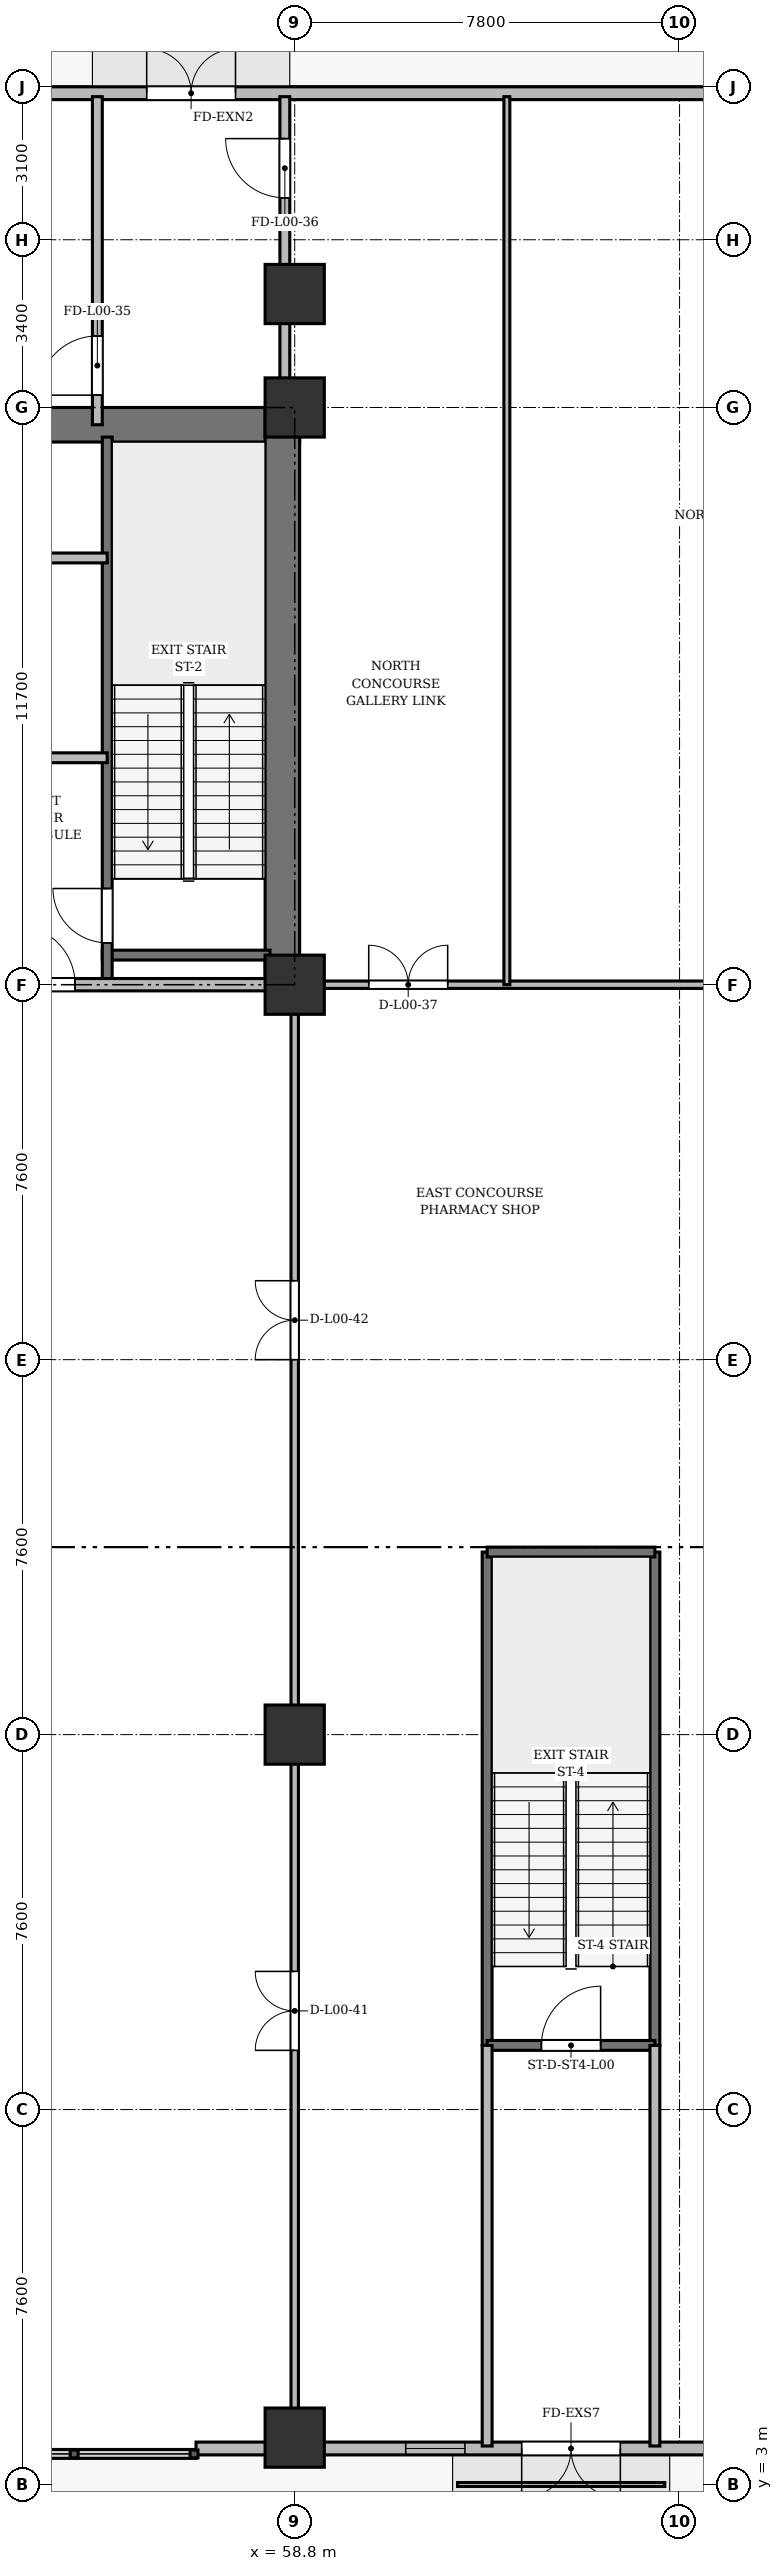
"""IFC4 building model, lengths in metres.
Left out: names, types, materials, properties, quantities, classifications, styles, units other than length and angle.
Written with IfcOpenShell. Run it as: python <this file> out.ifc"""

import sys

from ifc_helpers import new_model, si_unit, direction, frame, frame_2d, origin, origin_2d, place, context, subcontext, project, spatial, rectangle, extrude, source, transform, mapped, element, fill, save


model = new_model("IFC4")
c1 = context("Model", 3, precision=1e-05, world=origin(), true_north=direction((0.0, 1.0)))
c2 = subcontext(c1, "Body", "Model", "MODEL_VIEW")
j1 = project(units=[si_unit("LENGTHUNIT", "METRE"), si_unit("PLANEANGLEUNIT", "RADIAN")], contexts=[c1])
p1 = place(None, origin())
s1 = spatial("IfcSite", under=j1, at=p1, CompositionType="ELEMENT")
p2 = place(p1, origin())
s2 = spatial("IfcBuilding", under=s1, at=p2, CompositionType="ELEMENT")
p3 = place(p2, origin())
s3 = spatial("IfcBuildingStorey", under=s2, at=p3, CompositionType="ELEMENT", Elevation=0.0)
m1 = source(origin(), c2, "Body", "SweptSolid", [
    extrude(rectangle(XDim=1.2, YDim=1.2, at=origin_2d()), origin(), (0.0, 0.0, 1.0), 5.2),
])
for number, where, z_axis, x_axis in (
    (1, (58.8, 3.95, 0.0), (0.0, 0.0, 1.0), (1.0, 0.0, 0.0)),
    (2, (58.8, 18.2, 0.0), (0.0, 0.0, 1.0), (1.0, 0.0, 0.0)),
    (3, (58.8, 33.4, 0.0), (0.0, 0.0, 1.0), (1.0, 0.0, 0.0)),
    (4, (58.8, 45.1, 0.0), (0.0, 0.0, 1.0), (1.0, 0.0, 0.0)),
    (5, (58.8, 47.4, 0.0), (0.0, 0.0, 1.0), (1.0, 0.0, 0.0)),
):
    element("IfcColumn", number, at=place(p3, frame(where, z_axis=z_axis, x_axis=x_axis)), inside=s3, PredefinedType="COLUMN", context=c2, shape_type="MappedRepresentation", body=[
        mapped(m1, transform((0.0, 0.0, 0.0), x_axis=(1.0, 0.0, 0.0), y_axis=(0.0, 1.0, 0.0), z_axis=(0.0, 0.0, 1.0), scale=1.0)),
    ])
p4 = place(p3, frame((-2.05, 51.47, 0.0), z_axis=(0.0, 0.0, 1.0), x_axis=(1.0, 0.0, 0.0)))
e6 = element("IfcWall", 6, at=p4, inside=s3, PredefinedType="SOLIDWALL", context=c2, shape_type="SweptSolid", body=[
    extrude(rectangle(XDim=78.5, YDim=0.26, at=frame_2d((39.25, 0.0))), origin(), (0.0, 0.0, 1.0), 4.88),
])
p5 = place(p4, frame((3.0, 0.0, 0.0)))
e7 = element("IfcOpeningElement", 7, at=p5, cuts=e6, PredefinedType="OPENING", context=c2, shape_type="SweptSolid", body=[
    extrude(rectangle(XDim=6.0, YDim=4.2, at=frame_2d((3.0, 2.1))), frame((0.0, 0.14, 0.0), z_axis=(0.0, -1.0, 0.0), x_axis=(1.0, 0.0, 0.0)), (0.0, 0.0, 1.0), 0.28),
])
p6 = place(p4, frame((19.25, 0.0, 0.0)))
e8 = element("IfcOpeningElement", 8, at=p6, cuts=e6, PredefinedType="OPENING", context=c2, shape_type="SweptSolid", body=[
    extrude(rectangle(XDim=1.8, YDim=2.3, at=frame_2d((0.9, 1.15))), frame((0.0, 0.14, 0.0), z_axis=(0.0, -1.0, 0.0), x_axis=(1.0, 0.0, 0.0)), (0.0, 0.0, 1.0), 0.28),
])
p7 = place(p4, frame((57.85, 0.0, 0.0)))
e9 = element("IfcOpeningElement", 9, at=p7, cuts=e6, PredefinedType="OPENING", context=c2, shape_type="SweptSolid", body=[
    extrude(rectangle(XDim=1.8, YDim=2.3, at=frame_2d((0.9, 1.15))), frame((0.0, 0.14, 0.0), z_axis=(0.0, -1.0, 0.0), x_axis=(1.0, 0.0, 0.0)), (0.0, 0.0, 1.0), 0.28),
])
p8 = place(p3, frame((76.45, 3.73, 0.0), z_axis=(0.0, 0.0, 1.0), x_axis=(-1.0, 0.0, 0.0)))
e10 = element("IfcWall", 10, at=p8, inside=s3, PredefinedType="SOLIDWALL", context=c2, shape_type="SweptSolid", body=[
    extrude(rectangle(XDim=19.65, YDim=0.26, at=frame_2d((9.825, 0.0))), origin(), (0.0, 0.0, 1.0), 3.78),
])
p9 = place(p8, frame((6.8, 0.0, 0.0)))
e11 = element("IfcOpeningElement", 11, at=p9, cuts=e10, PredefinedType="OPENING", context=c2, shape_type="SweptSolid", body=[
    extrude(rectangle(XDim=2.0, YDim=2.4, at=frame_2d((1.0, 1.2))), frame((0.0, 0.14, 0.0), z_axis=(0.0, -1.0, 0.0), x_axis=(1.0, 0.0, 0.0)), (0.0, 0.0, 1.0), 0.28),
])
p10 = place(p8, frame((11.05, 0.0, 0.0)))
e12 = element("IfcOpeningElement", 12, at=p10, cuts=e10, PredefinedType="OPENING", context=c2, shape_type="SweptSolid", body=[
    extrude(rectangle(XDim=2.0, YDim=2.4, at=frame_2d((1.0, 1.2))), frame((0.0, 0.14, 0.0), z_axis=(0.0, -1.0, 0.0), x_axis=(1.0, 0.0, 0.0)), (0.0, 0.0, 1.0), 0.28),
])
p11 = place(p8, frame((1.0, 0.0, 0.9)))
e13 = element("IfcOpeningElement", 13, at=p11, cuts=e10, PredefinedType="OPENING", context=c2, shape_type="SweptSolid", body=[
    extrude(rectangle(XDim=1.2, YDim=2.2, at=frame_2d((0.6, 1.1))), frame((0.0, 0.14, 0.0), z_axis=(0.0, -1.0, 0.0), x_axis=(1.0, 0.0, 0.0)), (0.0, 0.0, 1.0), 0.28),
])
p12 = place(p8, frame((14.2, 0.0, 0.9)))
e14 = element("IfcOpeningElement", 14, at=p12, cuts=e10, PredefinedType="OPENING", context=c2, shape_type="SweptSolid", body=[
    extrude(rectangle(XDim=1.2, YDim=2.2, at=frame_2d((0.6, 1.1))), frame((0.0, 0.14, 0.0), z_axis=(0.0, -1.0, 0.0), x_axis=(1.0, 0.0, 0.0)), (0.0, 0.0, 1.0), 0.28),
])
p13 = place(p3, frame((15.5, 44.75, 0.0), z_axis=(0.0, 0.0, 1.0), x_axis=(1.0, 0.0, 0.0)))
e15 = element("IfcWall", 15, at=p13, inside=s3, PredefinedType="SHEAR", context=c2, shape_type="SweptSolid", body=[
    extrude(rectangle(XDim=43.4, YDim=0.7, at=frame_2d((21.7, 0.0))), origin(), (0.0, 0.0, 1.0), 4.88),
])
p14 = place(p3, frame((58.55, 33.4, 0.0), z_axis=(0.0, 0.0, 1.0), x_axis=(0.0, 1.0, 0.0)))
e16 = element("IfcWall", 16, at=p14, inside=s3, PredefinedType="SHEAR", context=c2, shape_type="SweptSolid", body=[
    extrude(rectangle(XDim=11.7, YDim=0.7, at=frame_2d((5.85, 0.0))), origin(), (0.0, 0.0, 1.0), 4.88),
])
p15 = place(p3, frame((54.9, 34.0, 0.0), z_axis=(0.0, 0.0, 1.0), x_axis=(1.0, 0.0, 0.0)))
e17 = element("IfcWall", 17, at=p15, inside=s3, PredefinedType="SHEAR", context=c2, shape_type="SweptSolid", body=[
    extrude(rectangle(XDim=3.4, YDim=0.2, at=frame_2d((1.7, 0.0))), origin(), (0.0, 0.0, 1.0), 4.88),
])
p16 = place(p3, frame((55.0, 33.4, 0.0), z_axis=(0.0, 0.0, 1.0), x_axis=(0.0, 1.0, 0.0)))
e18 = element("IfcWall", 18, at=p16, inside=s3, PredefinedType="SHEAR", context=c2, shape_type="SweptSolid", body=[
    extrude(rectangle(XDim=11.1, YDim=0.2, at=frame_2d((5.55, 0.0))), origin(), (0.0, 0.0, 1.0), 4.88),
])
p17 = place(p16, frame((0.85, 0.0, 0.0)))
e19 = element("IfcOpeningElement", 19, at=p17, cuts=e18, PredefinedType="OPENING", context=c2, shape_type="SweptSolid", body=[
    extrude(rectangle(XDim=1.1, YDim=2.15, at=frame_2d((0.55, 1.075))), frame((0.0, 0.11, 0.0), z_axis=(0.0, -1.0, 0.0), x_axis=(1.0, 0.0, 0.0)), (0.0, 0.0, 1.0), 0.22),
])
for number, where, z_axis, x_axis in (
    (20, (62.7, 11.9, 0.0), (0.0, 0.0, 1.0), (0.0, 1.0, 0.0)),
    (21, (66.1, 11.9, 0.0), (0.0, 0.0, 1.0), (0.0, 1.0, 0.0)),
):
    element("IfcWall", number, at=place(p3, frame(where, z_axis=z_axis, x_axis=x_axis)), inside=s3, PredefinedType="SHEAR", context=c2, shape_type="SweptSolid", body=[
        extrude(rectangle(XDim=10.0, YDim=0.2, at=frame_2d((5.0, 0.0))), origin(), (0.0, 0.0, 1.0), 4.88),
    ])
p18 = place(p3, frame((62.7, 11.9, 0.0), z_axis=(0.0, 0.0, 1.0), x_axis=(1.0, 0.0, 0.0)))
e22 = element("IfcWall", 22, at=p18, inside=s3, PredefinedType="SHEAR", context=c2, shape_type="SweptSolid", body=[
    extrude(rectangle(XDim=3.4, YDim=0.2, at=frame_2d((1.7, 0.0))), origin(), (0.0, 0.0, 1.0), 4.88),
])
p19 = place(p18, frame((1.1, 0.0, 0.0)))
e23 = element("IfcOpeningElement", 23, at=p19, cuts=e22, PredefinedType="OPENING", context=c2, shape_type="SweptSolid", body=[
    extrude(rectangle(XDim=1.2, YDim=2.15, at=frame_2d((0.6, 1.075))), frame((0.0, 0.11, 0.0), z_axis=(0.0, -1.0, 0.0), x_axis=(1.0, 0.0, 0.0)), (0.0, 0.0, 1.0), 0.22),
])
p20 = place(p3, frame((62.7, 21.9, 0.0), z_axis=(0.0, 0.0, 1.0), x_axis=(1.0, 0.0, 0.0)))
e24 = element("IfcWall", 24, at=p20, inside=s3, PredefinedType="SHEAR", context=c2, shape_type="SweptSolid", body=[
    extrude(rectangle(XDim=3.4, YDim=0.2, at=frame_2d((1.7, 0.0))), origin(), (0.0, 0.0, 1.0), 4.88),
])
p21 = place(p3, frame((47.15, 42.05, 0.0), z_axis=(0.0, 0.0, 1.0), x_axis=(1.0, 0.0, 0.0)))
e25 = element("IfcWall", 25, at=p21, inside=s3, PredefinedType="SOLIDWALL", context=c2, shape_type="SweptSolid", body=[
    extrude(rectangle(XDim=7.85, YDim=0.2, at=frame_2d((3.925, 0.0))), origin(), (0.0, 0.0, 1.0), 4.88),
])
p22 = place(p21, frame((0.75, 0.0, 0.0)))
e26 = element("IfcOpeningElement", 26, at=p22, cuts=e25, PredefinedType="OPENING", context=c2, shape_type="SweptSolid", body=[
    extrude(rectangle(XDim=0.9, YDim=2.1, at=frame_2d((0.45, 1.05))), frame((0.0, 0.11, 0.0), z_axis=(0.0, -1.0, 0.0), x_axis=(1.0, 0.0, 0.0)), (0.0, 0.0, 1.0), 0.22),
])
p23 = place(p21, frame((3.85, 0.0, 0.0)))
e27 = element("IfcOpeningElement", 27, at=p23, cuts=e25, PredefinedType="OPENING", context=c2, shape_type="SweptSolid", body=[
    extrude(rectangle(XDim=0.9, YDim=2.1, at=frame_2d((0.45, 1.05))), frame((0.0, 0.11, 0.0), z_axis=(0.0, -1.0, 0.0), x_axis=(1.0, 0.0, 0.0)), (0.0, 0.0, 1.0), 0.22),
])
p24 = place(p3, frame((52.45, 38.0, 0.0), z_axis=(0.0, 0.0, 1.0), x_axis=(1.0, 0.0, 0.0)))
e28 = element("IfcWall", 28, at=p24, inside=s3, PredefinedType="PARTITIONING", context=c2, shape_type="SweptSolid", body=[
    extrude(rectangle(XDim=2.55, YDim=0.2, at=frame_2d((1.275, 0.0))), origin(), (0.0, 0.0, 1.0), 4.88),
])
p25 = place(p3, frame((47.15, 33.4, 0.0), z_axis=(0.0, 0.0, 1.0), x_axis=(1.0, 0.0, 0.0)))
e29 = element("IfcWall", 29, at=p25, inside=s3, PredefinedType="PARTITIONING", context=c2, shape_type="SweptSolid", body=[
    extrude(rectangle(XDim=11.15, YDim=0.25, at=frame_2d((5.575, 0.0))), origin(), (0.0, 0.0, 1.0), 3.78),
])
p26 = place(p25, frame((0.7, 0.0, 0.0)))
e30 = element("IfcOpeningElement", 30, at=p26, cuts=e29, PredefinedType="OPENING", context=c2, shape_type="SweptSolid", body=[
    extrude(rectangle(XDim=0.95, YDim=2.15, at=frame_2d((0.475, 1.075))), frame((0.0, 0.135, 0.0), z_axis=(0.0, -1.0, 0.0), x_axis=(1.0, 0.0, 0.0)), (0.0, 0.0, 1.0), 0.27),
])
p27 = place(p25, frame((6.0, 0.0, 0.0)))
e31 = element("IfcOpeningElement", 31, at=p27, cuts=e29, PredefinedType="OPENING", context=c2, shape_type="SweptSolid", body=[
    extrude(rectangle(XDim=1.2, YDim=2.15, at=frame_2d((0.6, 1.075))), frame((0.0, 0.135, 0.0), z_axis=(0.0, -1.0, 0.0), x_axis=(1.0, 0.0, 0.0)), (0.0, 0.0, 1.0), 0.27),
])
p28 = place(p3, frame((54.8, 44.75, 0.0), z_axis=(0.0, 0.0, 1.0), x_axis=(0.0, 1.0, 0.0)))
e32 = element("IfcWall", 32, at=p28, inside=s3, PredefinedType="PARTITIONING", context=c2, shape_type="SweptSolid", body=[
    extrude(rectangle(XDim=6.65, YDim=0.2, at=frame_2d((3.325, 0.0))), origin(), (0.0, 0.0, 1.0), 3.78),
])
p29 = place(p28, frame((0.6, 0.0, 0.0)))
e33 = element("IfcOpeningElement", 33, at=p29, cuts=e32, PredefinedType="OPENING", context=c2, shape_type="SweptSolid", body=[
    extrude(rectangle(XDim=1.2, YDim=2.15, at=frame_2d((0.6, 1.075))), frame((0.0, 0.11, 0.0), z_axis=(0.0, -1.0, 0.0), x_axis=(1.0, 0.0, 0.0)), (0.0, 0.0, 1.0), 0.22),
])
p30 = place(p3, frame((58.6, 44.75, 0.0), z_axis=(0.0, 0.0, 1.0), x_axis=(0.0, 1.0, 0.0)))
e34 = element("IfcWall", 34, at=p30, inside=s3, PredefinedType="PARTITIONING", context=c2, shape_type="SweptSolid", body=[
    extrude(rectangle(XDim=6.65, YDim=0.2, at=frame_2d((3.325, 0.0))), origin(), (0.0, 0.0, 1.0), 3.78),
])
p31 = place(p30, frame((4.6, 0.0, 0.0)))
e35 = element("IfcOpeningElement", 35, at=p31, cuts=e34, PredefinedType="OPENING", context=c2, shape_type="SweptSolid", body=[
    extrude(rectangle(XDim=1.2, YDim=2.15, at=frame_2d((0.6, 1.075))), frame((0.0, 0.11, 0.0), z_axis=(0.0, -1.0, 0.0), x_axis=(1.0, 0.0, 0.0)), (0.0, 0.0, 1.0), 0.22),
])
p32 = place(p3, frame((58.5, 33.4, 0.0), z_axis=(0.0, 0.0, 1.0), x_axis=(1.0, 0.0, 0.0)))
e36 = element("IfcWall", 36, at=p32, inside=s3, PredefinedType="PARTITIONING", context=c2, shape_type="SweptSolid", body=[
    extrude(rectangle(XDim=17.95, YDim=0.15, at=frame_2d((8.975, 0.0))), origin(), (0.0, 0.0, 1.0), 3.78),
])
p33 = place(p32, frame((1.8, 0.0, 0.0)))
e37 = element("IfcOpeningElement", 37, at=p33, cuts=e36, PredefinedType="OPENING", context=c2, shape_type="SweptSolid", body=[
    extrude(rectangle(XDim=1.6, YDim=2.2, at=frame_2d((0.8, 1.1))), frame((0.0, 0.085, 0.0), z_axis=(0.0, -1.0, 0.0), x_axis=(1.0, 0.0, 0.0)), (0.0, 0.0, 1.0), 0.17),
])
p34 = place(p32, frame((9.5, 0.0, 0.0)))
e38 = element("IfcOpeningElement", 38, at=p34, cuts=e36, PredefinedType="OPENING", context=c2, shape_type="SweptSolid", body=[
    extrude(rectangle(XDim=1.6, YDim=2.2, at=frame_2d((0.8, 1.1))), frame((0.0, 0.085, 0.0), z_axis=(0.0, -1.0, 0.0), x_axis=(1.0, 0.0, 0.0)), (0.0, 0.0, 1.0), 0.17),
])
p35 = place(p3, frame((63.1, 33.4, 0.0), z_axis=(0.0, 0.0, 1.0), x_axis=(0.0, 1.0, 0.0)))
e39 = element("IfcWall", 39, at=p35, inside=s3, PredefinedType="PARTITIONING", context=c2, shape_type="SweptSolid", body=[
    extrude(rectangle(XDim=18.0, YDim=0.12, at=frame_2d((9.0, 0.0))), origin(), (0.0, 0.0, 1.0), 3.78),
])
for number, where, z_axis, x_axis in (
    (40, (62.7, 3.78, 0.0), (0.0, 0.0, 1.0), (0.0, 1.0, 0.0)),
    (41, (66.1, 3.78, 0.0), (0.0, 0.0, 1.0), (0.0, 1.0, 0.0)),
):
    element("IfcWall", number, at=place(p3, frame(where, z_axis=z_axis, x_axis=x_axis)), inside=s3, PredefinedType="PARTITIONING", context=c2, shape_type="SweptSolid", body=[
        extrude(rectangle(XDim=8.12, YDim=0.2, at=frame_2d((4.06, 0.0))), origin(), (0.0, 0.0, 1.0), 3.78),
    ])
p36 = place(p3, frame((58.8, 3.8, 0.0), z_axis=(0.0, 0.0, 1.0), x_axis=(0.0, 1.0, 0.0)))
e42 = element("IfcWall", 42, at=p36, inside=s3, PredefinedType="PARTITIONING", context=c2, shape_type="SweptSolid", body=[
    extrude(rectangle(XDim=29.6, YDim=0.15, at=frame_2d((14.8, 0.0))), origin(), (0.0, 0.0, 1.0), 4.08),
])
p37 = place(p36, frame((8.0, 0.0, 0.0)))
e43 = element("IfcOpeningElement", 43, at=p37, cuts=e42, PredefinedType="OPENING", context=c2, shape_type="SweptSolid", body=[
    extrude(rectangle(XDim=1.6, YDim=2.2, at=frame_2d((0.8, 1.1))), frame((0.0, 0.085, 0.0), z_axis=(0.0, -1.0, 0.0), x_axis=(1.0, 0.0, 0.0)), (0.0, 0.0, 1.0), 0.17),
])
p38 = place(p36, frame((22.0, 0.0, 0.0)))
e44 = element("IfcOpeningElement", 44, at=p38, cuts=e42, PredefinedType="OPENING", context=c2, shape_type="SweptSolid", body=[
    extrude(rectangle(XDim=1.6, YDim=2.2, at=frame_2d((0.8, 1.1))), frame((0.0, 0.085, 0.0), z_axis=(0.0, -1.0, 0.0), x_axis=(1.0, 0.0, 0.0)), (0.0, 0.0, 1.0), 0.17),
])
m2 = source(origin(), c2, "Body", "SweptSolid", [
    extrude(rectangle(XDim=1.8, YDim=2.3, at=frame_2d((0.9, 1.15))), frame((0.0, 0.025, 0.0), z_axis=(0.0, -1.0, 0.0), x_axis=(1.0, 0.0, 0.0)), (0.0, 0.0, 1.0), 0.05),
])
p39 = place(p7, origin())
e45 = element("IfcDoor", 45, at=p39, inside=s3, OperationType="DOUBLE_DOOR_SINGLE_SWING", PredefinedType="DOOR", context=c2, shape_type="MappedRepresentation", body=[
    mapped(m2, transform((0.0, 0.0, 0.0), x_axis=(1.0, 0.0, 0.0), y_axis=(0.0, 1.0, 0.0), z_axis=(0.0, 0.0, 1.0), scale=1.0)),
])
fill(e9, e45)
m3 = source(origin(), c2, "Body", "SweptSolid", [
    extrude(rectangle(XDim=2.0, YDim=2.4, at=frame_2d((1.0, 1.2))), frame((0.0, 0.025, 0.0), z_axis=(0.0, -1.0, 0.0), x_axis=(1.0, 0.0, 0.0)), (0.0, 0.0, 1.0), 0.05),
])
p40 = place(p10, origin())
e46 = element("IfcDoor", 46, at=p40, inside=s3, OperationType="DOUBLE_DOOR_SINGLE_SWING", PredefinedType="DOOR", context=c2, shape_type="MappedRepresentation", body=[
    mapped(m3, transform((0.0, 0.0, 0.0), x_axis=(1.0, 0.0, 0.0), y_axis=(0.0, 1.0, 0.0), z_axis=(0.0, 0.0, 1.0), scale=1.0)),
])
fill(e12, e46)
m4 = source(origin(), c2, "Body", "SweptSolid", [
    extrude(rectangle(XDim=1.2, YDim=2.2, at=frame_2d((0.6, 1.1))), frame((0.0, 0.03, 0.0), z_axis=(0.0, -1.0, 0.0), x_axis=(1.0, 0.0, 0.0)), (0.0, 0.0, 1.0), 0.06),
])
p41 = place(p12, origin())
e47 = element("IfcWindow", 47, at=p41, inside=s3, PartitioningType="SINGLE_PANEL", PredefinedType="WINDOW", context=c2, shape_type="MappedRepresentation", body=[
    mapped(m4, transform((0.0, 0.0, 0.0), x_axis=(1.0, 0.0, 0.0), y_axis=(0.0, 1.0, 0.0), z_axis=(0.0, 0.0, 1.0), scale=1.0)),
])
fill(e14, e47)
m5 = source(origin(), c2, "Body", "SweptSolid", [
    extrude(rectangle(XDim=1.1, YDim=2.15, at=frame_2d((0.55, 1.075))), frame((0.0, 0.025, 0.0), z_axis=(0.0, -1.0, 0.0), x_axis=(1.0, 0.0, 0.0)), (0.0, 0.0, 1.0), 0.05),
])
p42 = place(p17, origin())
e48 = element("IfcDoor", 48, at=p42, inside=s3, OperationType="SINGLE_SWING_RIGHT", PredefinedType="DOOR", context=c2, shape_type="MappedRepresentation", body=[
    mapped(m5, transform((0.0, 0.0, 0.0), x_axis=(1.0, 0.0, 0.0), y_axis=(0.0, 1.0, 0.0), z_axis=(0.0, 0.0, 1.0), scale=1.0)),
])
fill(e19, e48)
m6 = source(origin(), c2, "Body", "SweptSolid", [
    extrude(rectangle(XDim=1.2, YDim=2.15, at=frame_2d((0.6, 1.075))), frame((0.0, 0.025, 0.0), z_axis=(0.0, -1.0, 0.0), x_axis=(1.0, 0.0, 0.0)), (0.0, 0.0, 1.0), 0.05),
])
p43 = place(p19, origin())
e49 = element("IfcDoor", 49, at=p43, inside=s3, OperationType="SINGLE_SWING_RIGHT", PredefinedType="DOOR", context=c2, shape_type="MappedRepresentation", body=[
    mapped(m6, transform((0.0, 0.0, 0.0), x_axis=(1.0, 0.0, 0.0), y_axis=(0.0, 1.0, 0.0), z_axis=(0.0, 0.0, 1.0), scale=1.0)),
])
fill(e23, e49)
p44 = place(p27, origin())
e50 = element("IfcDoor", 50, at=p44, inside=s3, OperationType="SINGLE_SWING_LEFT", PredefinedType="DOOR", context=c2, shape_type="MappedRepresentation", body=[
    mapped(m6, transform((0.0, 0.0, 0.0), x_axis=(1.0, 0.0, 0.0), y_axis=(0.0, 1.0, 0.0), z_axis=(0.0, 0.0, 1.0), scale=1.0)),
])
fill(e31, e50)
p45 = place(p29, origin())
e51 = element("IfcDoor", 51, at=p45, inside=s3, OperationType="SINGLE_SWING_LEFT", PredefinedType="DOOR", context=c2, shape_type="MappedRepresentation", body=[
    mapped(m6, transform((0.0, 0.0, 0.0), x_axis=(1.0, 0.0, 0.0), y_axis=(0.0, 1.0, 0.0), z_axis=(0.0, 0.0, 1.0), scale=1.0)),
])
fill(e33, e51)
p46 = place(p31, origin())
e52 = element("IfcDoor", 52, at=p46, inside=s3, OperationType="SINGLE_SWING_RIGHT", PredefinedType="DOOR", context=c2, shape_type="MappedRepresentation", body=[
    mapped(m6, transform((0.0, 0.0, 0.0), x_axis=(1.0, 0.0, 0.0), y_axis=(0.0, 1.0, 0.0), z_axis=(0.0, 0.0, 1.0), scale=1.0)),
])
fill(e35, e52)
m7 = source(origin(), c2, "Body", "SweptSolid", [
    extrude(rectangle(XDim=1.6, YDim=2.2, at=frame_2d((0.8, 1.1))), frame((0.0, 0.025, 0.0), z_axis=(0.0, -1.0, 0.0), x_axis=(1.0, 0.0, 0.0)), (0.0, 0.0, 1.0), 0.05),
])
p47 = place(p33, origin())
e53 = element("IfcDoor", 53, at=p47, inside=s3, OperationType="DOUBLE_DOOR_SINGLE_SWING", PredefinedType="DOOR", context=c2, shape_type="MappedRepresentation", body=[
    mapped(m7, transform((0.0, 0.0, 0.0), x_axis=(1.0, 0.0, 0.0), y_axis=(0.0, 1.0, 0.0), z_axis=(0.0, 0.0, 1.0), scale=1.0)),
])
fill(e37, e53)
p48 = place(p37, origin())
e54 = element("IfcDoor", 54, at=p48, inside=s3, OperationType="DOUBLE_DOOR_SINGLE_SWING", PredefinedType="DOOR", context=c2, shape_type="MappedRepresentation", body=[
    mapped(m7, transform((0.0, 0.0, 0.0), x_axis=(1.0, 0.0, 0.0), y_axis=(0.0, 1.0, 0.0), z_axis=(0.0, 0.0, 1.0), scale=1.0)),
])
fill(e43, e54)
p49 = place(p38, origin())
e55 = element("IfcDoor", 55, at=p49, inside=s3, OperationType="DOUBLE_DOOR_SINGLE_SWING", PredefinedType="DOOR", context=c2, shape_type="MappedRepresentation", body=[
    mapped(m7, transform((0.0, 0.0, 0.0), x_axis=(1.0, 0.0, 0.0), y_axis=(0.0, 1.0, 0.0), z_axis=(0.0, 0.0, 1.0), scale=1.0)),
])
fill(e44, e55)
save(model, sys.argv[1])
